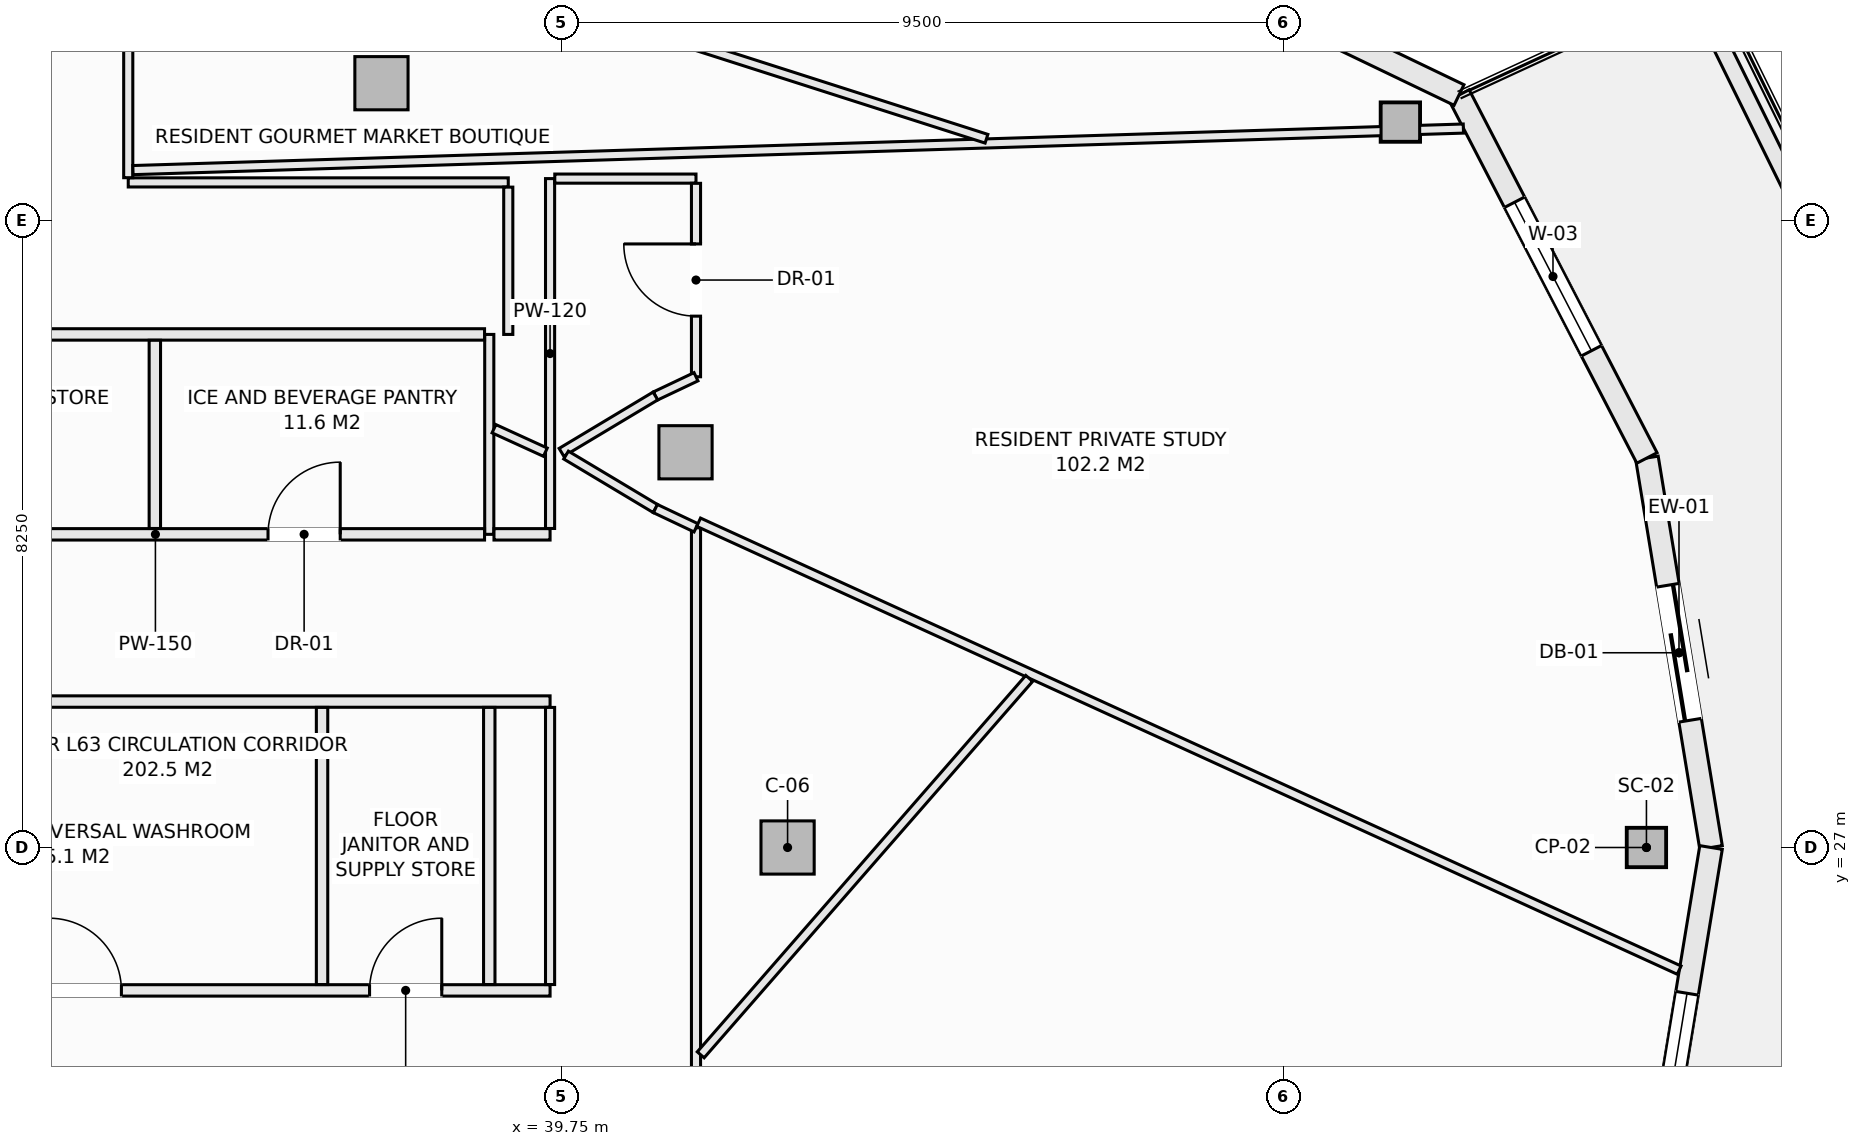
"""IFC4 building model, lengths in metres.
Left out: names, types, materials, properties, quantities, classifications, styles, units other than length and angle.
Written with IfcOpenShell. Run it as: python <this file> out.ifc"""

import sys

from ifc_helpers import new_model, si_unit, direction, frame, frame_2d, origin, origin_2d, place, context, subcontext, project, spatial, rectangle, hollow_rectangle, extrude, element, fill, save


model = new_model("IFC4")
c1 = context("Model", 3, precision=1e-05, world=origin(), true_north=direction((0.0, 1.0)))
c2 = subcontext(c1, "Body", "Model", "MODEL_VIEW")
j1 = project(units=[si_unit("LENGTHUNIT", "METRE"), si_unit("PLANEANGLEUNIT", "RADIAN")], contexts=[c1])
p1 = place(None, origin())
s1 = spatial("IfcSite", under=j1, at=p1, CompositionType="ELEMENT")
p2 = place(p1, origin())
s2 = spatial("IfcBuilding", under=s1, at=p2, CompositionType="ELEMENT")
p3 = place(p2, frame((0.0, 0.0, 236.0)))
s3 = spatial("IfcBuildingStorey", under=s2, at=p3, CompositionType="ELEMENT", Elevation=236.0)
for number, where, z_axis, x_axis in (
    (1, (54.025, 27.0, -0.27), (0.0, 0.0, 1.0), (1.0, 0.0, 0.0)),
    (2, (50.787, 36.544, -0.27), (0.0, 0.0, 1.0), (1.0, 0.0, 0.0)),
):
    element("IfcColumn", number, at=place(p3, frame(where, z_axis=z_axis, x_axis=x_axis)), inside=s3, PredefinedType="COLUMN", context=c2, shape_type="SweptSolid", body=[
        extrude(hollow_rectangle(XDim=0.508, YDim=0.508, WallThickness=0.019, at=origin_2d()), origin(), (0.0, 0.0, 1.0), 3.3),
    ])
for number, where, z_axis, x_axis in (
    (3, (42.725, 27.0, -0.27), (0.0, 0.0, 1.0), (1.0, 0.0, 0.0)),
    (4, (41.382, 32.199, -0.27), (0.0, 0.0, 1.0), (1.0, 0.0, 0.0)),
    (5, (37.382, 37.055, -0.27), (0.0, 0.0, 1.0), (1.0, 0.0, 0.0)),
):
    element("IfcColumn", number, at=place(p3, frame(where, z_axis=z_axis, x_axis=x_axis)), inside=s3, PredefinedType="COLUMN", context=c2, shape_type="SweptSolid", body=[
        extrude(rectangle(XDim=0.7, YDim=0.7, at=origin_2d()), origin(), (0.0, 0.0, 1.0), 3.3),
    ])
p4 = place(p3, frame((54.032, 32.125, 0.0), z_axis=(0.0, 0.0, 1.0), x_axis=(0.16237087798, -0.986729799886, 0.0)))
e6 = element("IfcWall", 6, at=p4, inside=s3, PredefinedType="SOLIDWALL", context=c2, shape_type="SweptSolid", body=[
    extrude(rectangle(XDim=5.193, YDim=0.3, at=frame_2d((2.597, 0.0))), origin(), (0.0, 0.0, 1.0), 2.605),
])
p5 = place(p4, frame((1.697, 0.0, 0.0)))
e7 = element("IfcOpeningElement", 7, at=p5, cuts=e6, PredefinedType="OPENING", context=c2, shape_type="SweptSolid", body=[
    extrude(rectangle(XDim=1.8, YDim=2.25, at=frame_2d((0.9, 1.125))), frame((0.0, 0.16, 0.0), z_axis=(0.0, -1.0, 0.0), x_axis=(1.0, 0.0, 0.0)), (0.0, 0.0, 1.0), 0.32),
])
p6 = place(p3, frame((51.559, 36.9, 0.0), z_axis=(0.0, 0.0, 1.0), x_axis=(0.459808219482, -0.888018243786, 0.0)))
e8 = element("IfcWall", 8, at=p6, inside=s3, PredefinedType="SOLIDWALL", context=c2, shape_type="SweptSolid", body=[
    extrude(rectangle(XDim=5.378, YDim=0.3, at=frame_2d((2.689, 0.0))), origin(), (0.0, 0.0, 1.0), 2.605),
])
p7 = place(p6, frame((1.589, 0.0, 0.72)))
e9 = element("IfcOpeningElement", 9, at=p7, cuts=e8, PredefinedType="OPENING", context=c2, shape_type="SweptSolid", body=[
    extrude(rectangle(XDim=2.2, YDim=1.65, at=frame_2d((1.1, 0.825))), frame((0.0, 0.16, 0.0), z_axis=(0.0, -1.0, 0.0), x_axis=(1.0, 0.0, 0.0)), (0.0, 0.0, 1.0), 0.32),
])
p8 = place(p3, frame((46.133, 39.507, 0.0), z_axis=(0.0, 0.0, 1.0), x_axis=(0.901348331142, -0.433094892545, 0.0)))
e10 = element("IfcWall", 10, at=p8, inside=s3, PredefinedType="SOLIDWALL", context=c2, shape_type="SweptSolid", body=[
    extrude(rectangle(XDim=6.021, YDim=0.3, at=frame_2d((3.01, 0.0))), origin(), (0.0, 0.0, 1.0), 2.605),
])
p9 = place(p8, frame((1.91, 0.0, 0.72)))
e11 = element("IfcOpeningElement", 11, at=p9, cuts=e10, PredefinedType="OPENING", context=c2, shape_type="SweptSolid", body=[
    extrude(rectangle(XDim=2.2, YDim=1.65, at=frame_2d((1.1, 0.825))), frame((0.0, 0.16, 0.0), z_axis=(0.0, -1.0, 0.0), x_axis=(1.0, 0.0, 0.0)), (0.0, 0.0, 1.0), 0.32),
])
p10 = place(p3, frame((54.032, 21.875, 0.0), z_axis=(0.0, 0.0, 1.0), x_axis=(0.16237087798, 0.986729799886, 0.0)))
e12 = element("IfcWall", 12, at=p10, inside=s3, PredefinedType="SOLIDWALL", context=c2, shape_type="SweptSolid", body=[
    extrude(rectangle(XDim=5.193, YDim=0.3, at=frame_2d((2.597, 0.0))), origin(), (0.0, 0.0, 1.0), 2.605),
])
p11 = place(p10, frame((1.05, 0.0, 0.72)))
e13 = element("IfcOpeningElement", 13, at=p11, cuts=e12, PredefinedType="OPENING", context=c2, shape_type="SweptSolid", body=[
    extrude(rectangle(XDim=2.2, YDim=1.65, at=frame_2d((1.1, 0.825))), frame((0.0, 0.16, 0.0), z_axis=(0.0, -1.0, 0.0), x_axis=(1.0, 0.0, 0.0)), (0.0, 0.0, 1.0), 0.32),
])
p12 = place(p3, frame((54.616, 38.347, 0.0), z_axis=(0.0, 0.0, 1.0), x_axis=(0.441640961804, -0.897191875162, 0.0)))
e14 = element("IfcWall", 14, at=p12, inside=s3, PredefinedType="PARAPET", context=c2, shape_type="SweptSolid", body=[
    extrude(rectangle(XDim=6.178, YDim=0.22, at=frame_2d((3.089, 0.0))), origin(), (0.0, 0.0, 1.0), 0.52),
])
p13 = place(p3, frame((29.96, 25.12, 0.0), z_axis=(0.0, 0.0, 1.0), x_axis=(1.0, 0.0, 0.0)))
e15 = element("IfcWall", 15, at=p13, inside=s3, PredefinedType="PARTITIONING", context=c2, shape_type="SweptSolid", body=[
    extrude(rectangle(XDim=9.64, YDim=0.15, at=frame_2d((4.82, 0.0))), origin(), (0.0, 0.0, 1.0), 3.03),
])
p14 = place(p13, frame((3.05, 0.0, 0.0)))
e16 = element("IfcOpeningElement", 16, at=p14, cuts=e15, PredefinedType="OPENING", context=c2, shape_type="SweptSolid", body=[
    extrude(rectangle(XDim=0.95, YDim=2.1, at=frame_2d((0.475, 1.05))), frame((0.0, 0.085, 0.0), z_axis=(0.0, -1.0, 0.0), x_axis=(1.0, 0.0, 0.0)), (0.0, 0.0, 1.0), 0.17),
])
p15 = place(p13, frame((7.265, 0.0, 0.0)))
e17 = element("IfcOpeningElement", 17, at=p15, cuts=e15, PredefinedType="OPENING", context=c2, shape_type="SweptSolid", body=[
    extrude(rectangle(XDim=0.95, YDim=2.1, at=frame_2d((0.475, 1.05))), frame((0.0, 0.085, 0.0), z_axis=(0.0, -1.0, 0.0), x_axis=(1.0, 0.0, 0.0)), (0.0, 0.0, 1.0), 0.17),
])
p16 = place(p3, frame((30.077, 28.92, 0.0), z_axis=(0.0, 0.0, 1.0), x_axis=(1.0, 0.0, 0.0)))
e18 = element("IfcWall", 18, at=p16, inside=s3, PredefinedType="PARTITIONING", context=c2, shape_type="SweptSolid", body=[
    extrude(rectangle(XDim=9.523, YDim=0.15, at=frame_2d((4.762, 0.0))), origin(), (0.0, 0.0, 1.0), 3.03),
])
for number, where, z_axis, x_axis in (
    (19, (36.6, 25.197, 0.0), (0.0, 0.0, 1.0), (0.0, 1.0, 0.0)),
    (20, (38.8, 25.197, 0.0), (0.0, 0.0, 1.0), (0.0, 1.0, 0.0)),
):
    element("IfcWall", number, at=place(p3, frame(where, z_axis=z_axis, x_axis=x_axis)), inside=s3, PredefinedType="PARTITIONING", context=c2, shape_type="SweptSolid", body=[
        extrude(rectangle(XDim=3.646, YDim=0.15, at=frame_2d((1.823, 0.0))), origin(), (0.0, 0.0, 1.0), 3.03),
    ])
p17 = place(p3, frame((38.8, 31.12, 0.0), z_axis=(0.0, 0.0, 1.0), x_axis=(0.0, 1.0, 0.0)))
e21 = element("IfcWall", 21, at=p17, inside=s3, PredefinedType="PARTITIONING", context=c2, shape_type="SweptSolid", body=[
    extrude(rectangle(XDim=2.63, YDim=0.12, at=frame_2d((1.315, 0.0))), origin(), (0.0, 0.0, 1.0), 3.03),
])
p18 = place(p3, frame((30.077, 31.12, 0.0), z_axis=(0.0, 0.0, 1.0), x_axis=(1.0, 0.0, 0.0)))
e22 = element("IfcWall", 22, at=p18, inside=s3, PredefinedType="PARTITIONING", context=c2, shape_type="SweptSolid", body=[
    extrude(rectangle(XDim=8.661, YDim=0.15, at=frame_2d((4.331, 0.0))), origin(), (0.0, 0.0, 1.0), 3.03),
])
p19 = place(p18, frame((1.892, 0.0, 0.0)))
e23 = element("IfcOpeningElement", 23, at=p19, cuts=e22, PredefinedType="OPENING", context=c2, shape_type="SweptSolid", body=[
    extrude(rectangle(XDim=0.95, YDim=2.1, at=frame_2d((0.475, 1.05))), frame((0.0, 0.085, 0.0), z_axis=(0.0, -1.0, 0.0), x_axis=(1.0, 0.0, 0.0)), (0.0, 0.0, 1.0), 0.17),
])
p20 = place(p18, frame((5.812, 0.0, 0.0)))
e24 = element("IfcOpeningElement", 24, at=p20, cuts=e22, PredefinedType="OPENING", context=c2, shape_type="SweptSolid", body=[
    extrude(rectangle(XDim=0.95, YDim=2.1, at=frame_2d((0.475, 1.05))), frame((0.0, 0.085, 0.0), z_axis=(0.0, -1.0, 0.0), x_axis=(1.0, 0.0, 0.0)), (0.0, 0.0, 1.0), 0.17),
])
p21 = place(p3, frame((38.862, 31.12, 0.0), z_axis=(0.0, 0.0, 1.0), x_axis=(1.0, 0.0, 0.0)))
e25 = element("IfcWall", 25, at=p21, inside=s3, PredefinedType="PARTITIONING", context=c2, shape_type="SweptSolid", body=[
    extrude(rectangle(XDim=0.738, YDim=0.15, at=frame_2d((0.369, 0.0))), origin(), (0.0, 0.0, 1.0), 3.03),
])
p22 = place(p3, frame((30.077, 33.75, 0.0), z_axis=(0.0, 0.0, 1.0), x_axis=(1.0, 0.0, 0.0)))
e26 = element("IfcWall", 26, at=p22, inside=s3, PredefinedType="PARTITIONING", context=c2, shape_type="SweptSolid", body=[
    extrude(rectangle(XDim=8.661, YDim=0.15, at=frame_2d((4.331, 0.0))), origin(), (0.0, 0.0, 1.0), 3.03),
])
p23 = place(p3, frame((34.4, 31.197, 0.0), z_axis=(0.0, 0.0, 1.0), x_axis=(0.0, 1.0, 0.0)))
e27 = element("IfcWall", 27, at=p23, inside=s3, PredefinedType="PARTITIONING", context=c2, shape_type="SweptSolid", body=[
    extrude(rectangle(XDim=2.476, YDim=0.15, at=frame_2d((1.238, 0.0))), origin(), (0.0, 0.0, 1.0), 3.03),
])
p24 = place(p3, frame((34.05, 35.75, 0.0), z_axis=(0.0, 0.0, 1.0), x_axis=(1.0, 0.0, 0.0)))
e28 = element("IfcWall", 28, at=p24, inside=s3, PredefinedType="PARTITIONING", context=c2, shape_type="SweptSolid", body=[
    extrude(rectangle(XDim=5.0, YDim=0.12, at=frame_2d((2.5, 0.0))), origin(), (0.0, 0.0, 1.0), 2.478),
])
p25 = place(p3, frame((34.05, 35.812, 0.0), z_axis=(0.0, 0.0, 1.0), x_axis=(0.0, 1.0, 0.0)))
e29 = element("IfcWall", 29, at=p25, inside=s3, PredefinedType="PARTITIONING", context=c2, shape_type="SweptSolid", body=[
    extrude(rectangle(XDim=6.326, YDim=0.12, at=frame_2d((3.163, 0.0))), origin(), (0.0, 0.0, 1.0), 2.77),
])
p26 = place(p25, frame((1.799, 0.0, 0.0)))
e30 = element("IfcOpeningElement", 30, at=p26, cuts=e29, PredefinedType="OPENING", context=c2, shape_type="SweptSolid", body=[
    extrude(rectangle(XDim=0.95, YDim=2.1, at=frame_2d((0.475, 1.05))), frame((0.0, 0.07, 0.0), z_axis=(0.0, -1.0, 0.0), x_axis=(1.0, 0.0, 0.0)), (0.0, 0.0, 1.0), 0.14),
])
p27 = place(p25, frame((4.54, 0.0, 0.0)))
e31 = element("IfcOpeningElement", 31, at=p27, cuts=e29, PredefinedType="OPENING", context=c2, shape_type="SweptSolid", body=[
    extrude(rectangle(XDim=0.95, YDim=2.1, at=frame_2d((0.475, 1.05))), frame((0.0, 0.07, 0.0), z_axis=(0.0, -1.0, 0.0), x_axis=(1.0, 0.0, 0.0)), (0.0, 0.0, 1.0), 0.14),
])
p28 = place(p3, frame((39.05, 33.75, 0.0), z_axis=(0.0, 0.0, 1.0), x_axis=(0.0, 1.0, 0.0)))
e32 = element("IfcWall", 32, at=p28, inside=s3, PredefinedType="PARTITIONING", context=c2, shape_type="SweptSolid", body=[
    extrude(rectangle(XDim=1.938, YDim=0.12, at=frame_2d((0.969, 0.0))), origin(), (0.0, 0.0, 1.0), 3.03),
])
p29 = place(p3, frame((39.6, 25.197, 0.0), z_axis=(0.0, 0.0, 1.0), x_axis=(0.0, 1.0, 0.0)))
e33 = element("IfcWall", 33, at=p29, inside=s3, PredefinedType="PARTITIONING", context=c2, shape_type="SweptSolid", body=[
    extrude(rectangle(XDim=3.646, YDim=0.12, at=frame_2d((1.823, 0.0))), origin(), (0.0, 0.0, 1.0), 3.03),
])
p30 = place(p3, frame((39.6, 31.197, 0.0), z_axis=(0.0, 0.0, 1.0), x_axis=(0.0, 1.0, 0.0)))
e34 = element("IfcWall", 34, at=p30, inside=s3, PredefinedType="PARTITIONING", context=c2, shape_type="SweptSolid", body=[
    extrude(rectangle(XDim=4.603, YDim=0.12, at=frame_2d((2.302, 0.0))), origin(), (0.0, 0.0, 1.0), 3.03),
])
p31 = place(p3, frame((39.662, 35.8, 0.0), z_axis=(0.0, 0.0, 1.0), x_axis=(1.0, 0.0, 0.0)))
e35 = element("IfcWall", 35, at=p31, inside=s3, PredefinedType="PARTITIONING", context=c2, shape_type="SweptSolid", body=[
    extrude(rectangle(XDim=1.858, YDim=0.12, at=frame_2d((0.929, 0.0))), origin(), (0.0, 0.0, 1.0), 2.77),
])
p32 = place(p3, frame((41.52, 22.794, 0.0), z_axis=(0.0, 0.0, 1.0), x_axis=(0.0, 1.0, 0.0)))
e36 = element("IfcWall", 36, at=p32, inside=s3, PredefinedType="PARTITIONING", context=c2, shape_type="SweptSolid", body=[
    extrude(rectangle(XDim=8.412, YDim=0.12, at=frame_2d((4.206, 0.0))), origin(), (0.0, 0.0, 1.0), 2.478),
])
p33 = place(p3, frame((41.52, 33.193, 0.0), z_axis=(0.0, 0.0, 1.0), x_axis=(0.0, 1.0, 0.0)))
e37 = element("IfcWall", 37, at=p33, inside=s3, PredefinedType="PARTITIONING", context=c2, shape_type="SweptSolid", body=[
    extrude(rectangle(XDim=2.545, YDim=0.12, at=frame_2d((1.272, 0.0))), origin(), (0.0, 0.0, 1.0), 3.03),
])
p34 = place(p33, frame((0.798, 0.0, 0.0)))
e38 = element("IfcOpeningElement", 38, at=p34, cuts=e37, PredefinedType="OPENING", context=c2, shape_type="SweptSolid", body=[
    extrude(rectangle(XDim=0.95, YDim=2.1, at=frame_2d((0.475, 1.05))), frame((0.0, 0.07, 0.0), z_axis=(0.0, -1.0, 0.0), x_axis=(1.0, 0.0, 0.0)), (0.0, 0.0, 1.0), 0.14),
])
p35 = place(p3, frame((40.986, 32.94, 0.0), z_axis=(0.0, 0.0, 1.0), x_axis=(0.90356951601, 0.428441512621, 0.0)))
e39 = element("IfcWall", 39, at=p35, inside=s3, PredefinedType="PARTITIONING", context=c2, shape_type="SweptSolid", body=[
    extrude(rectangle(XDim=0.591, YDim=0.12, at=frame_2d((0.295, 0.0))), origin(), (0.0, 0.0, 1.0), 3.03),
])
p36 = place(p3, frame((39.75, 32.199, 0.0), z_axis=(0.0, 0.0, 1.0), x_axis=(0.857702120906, 0.514146935996, 0.0)))
e40 = element("IfcWall", 40, at=p36, inside=s3, PredefinedType="PARTITIONING", context=c2, shape_type="SweptSolid", body=[
    extrude(rectangle(XDim=1.441, YDim=0.12, at=frame_2d((0.721, 0.0))), origin(), (0.0, 0.0, 1.0), 3.03),
])
p37 = place(p3, frame((39.81, 32.163, 0.0), z_axis=(0.0, 0.0, 1.0), x_axis=(0.858011245414, -0.513630901273, 0.0)))
e41 = element("IfcWall", 41, at=p37, inside=s3, PredefinedType="PARTITIONING", context=c2, shape_type="SweptSolid", body=[
    extrude(rectangle(XDim=1.37, YDim=0.12, at=frame_2d((0.685, 0.0))), origin(), (0.0, 0.0, 1.0), 3.03),
])
p38 = place(p3, frame((40.986, 31.459, 0.0), z_axis=(0.0, 0.0, 1.0), x_axis=(0.903729424576, -0.428104107847, 0.0)))
e42 = element("IfcWall", 42, at=p38, inside=s3, PredefinedType="PARTITIONING", context=c2, shape_type="SweptSolid", body=[
    extrude(rectangle(XDim=0.591, YDim=0.12, at=frame_2d((0.295, 0.0))), origin(), (0.0, 0.0, 1.0), 3.03),
])
p39 = place(p3, frame((38.862, 32.51, 0.0), z_axis=(0.0, 0.0, 1.0), x_axis=(0.909577362943, -0.415534620485, 0.0)))
e43 = element("IfcWall", 43, at=p39, inside=s3, PredefinedType="PARTITIONING", context=c2, shape_type="SweptSolid", body=[
    extrude(rectangle(XDim=0.743, YDim=0.12, at=frame_2d((0.372, 0.0))), origin(), (0.0, 0.0, 1.0), 3.03),
])
p40 = place(p3, frame((41.555, 31.279, 0.0), z_axis=(0.0, 0.0, 1.0), x_axis=(0.909606839037, -0.41547009324, 0.0)))
e44 = element("IfcWall", 44, at=p40, inside=s3, PredefinedType="PARTITIONING", context=c2, shape_type="SweptSolid", body=[
    extrude(rectangle(XDim=14.183, YDim=0.12, at=frame_2d((7.091, 0.0))), origin(), (0.0, 0.0, 1.0), 1.823),
])
p41 = place(p3, frame((41.582, 24.272, 0.0), z_axis=(0.0, 0.0, 1.0), x_axis=(0.657567979998, 0.753395216126, 0.0)))
e45 = element("IfcWall", 45, at=p41, inside=s3, PredefinedType="PARTITIONING", context=c2, shape_type="SweptSolid", body=[
    extrude(rectangle(XDim=6.573, YDim=0.12, at=frame_2d((3.287, 0.0))), origin(), (0.0, 0.0, 1.0), 2.478),
])
p42 = place(p3, frame((34.112, 35.912, 0.0), z_axis=(0.0, 0.0, 1.0), x_axis=(0.999512755879, 0.031212991442, 0.0)))
e46 = element("IfcWall", 46, at=p42, inside=s3, PredefinedType="PARTITIONING", context=c2, shape_type="SweptSolid", body=[
    extrude(rectangle(XDim=17.513, YDim=0.12, at=frame_2d((8.756, 0.0))), origin(), (0.0, 0.0, 1.0), 1.823),
])
p43 = place(p3, frame((34.112, 39.918, 0.0), z_axis=(0.0, 0.0, 1.0), x_axis=(0.95242438762, -0.304774975789, 0.0)))
e47 = element("IfcWall", 47, at=p43, inside=s3, PredefinedType="PARTITIONING", context=c2, shape_type="SweptSolid", body=[
    extrude(rectangle(XDim=11.791, YDim=0.12, at=frame_2d((5.896, 0.0))), origin(), (0.0, 0.0, 1.0), 3.03),
])
p44 = place(p5, origin())
e48 = element("IfcDoor", 48, at=p44, inside=s3, OperationType="SLIDING_TO_LEFT", PredefinedType="DOOR", context=c2, shape_type="SweptSolid", body=[
    extrude(rectangle(XDim=1.8, YDim=2.25, at=frame_2d((0.9, 1.125))), frame((0.0, 0.025, 0.0), z_axis=(0.0, -1.0, 0.0), x_axis=(1.0, 0.0, 0.0)), (0.0, 0.0, 1.0), 0.05),
])
fill(e7, e48)
p45 = place(p7, origin())
e49 = element("IfcWindow", 49, at=p45, inside=s3, PartitioningType="SINGLE_PANEL", PredefinedType="WINDOW", context=c2, shape_type="SweptSolid", body=[
    extrude(rectangle(XDim=2.2, YDim=1.65, at=frame_2d((1.1, 0.825))), frame((0.0, 0.03, 0.0), z_axis=(0.0, -1.0, 0.0), x_axis=(1.0, 0.0, 0.0)), (0.0, 0.0, 1.0), 0.06),
])
fill(e9, e49)
p46 = place(p11, origin())
e50 = element("IfcWindow", 50, at=p46, inside=s3, PartitioningType="SINGLE_PANEL", PredefinedType="WINDOW", context=c2, shape_type="SweptSolid", body=[
    extrude(rectangle(XDim=2.2, YDim=1.65, at=frame_2d((1.1, 0.825))), frame((0.0, 0.03, 0.0), z_axis=(0.0, -1.0, 0.0), x_axis=(1.0, 0.0, 0.0)), (0.0, 0.0, 1.0), 0.06),
])
fill(e13, e50)
p47 = place(p14, origin())
e51 = element("IfcDoor", 51, at=p47, inside=s3, OperationType="SINGLE_SWING_LEFT", PredefinedType="DOOR", context=c2, shape_type="SweptSolid", body=[
    extrude(rectangle(XDim=0.95, YDim=2.1, at=frame_2d((0.475, 1.05))), frame((0.0, 0.025, 0.0), z_axis=(0.0, -1.0, 0.0), x_axis=(1.0, 0.0, 0.0)), (0.0, 0.0, 1.0), 0.05),
])
fill(e16, e51)
p48 = place(p15, origin())
e52 = element("IfcDoor", 52, at=p48, inside=s3, OperationType="SINGLE_SWING_RIGHT", PredefinedType="DOOR", context=c2, shape_type="SweptSolid", body=[
    extrude(rectangle(XDim=0.95, YDim=2.1, at=frame_2d((0.475, 1.05))), frame((0.0, 0.025, 0.0), z_axis=(0.0, -1.0, 0.0), x_axis=(1.0, 0.0, 0.0)), (0.0, 0.0, 1.0), 0.05),
])
fill(e17, e52)
p49 = place(p20, origin())
e53 = element("IfcDoor", 53, at=p49, inside=s3, OperationType="SINGLE_SWING_RIGHT", PredefinedType="DOOR", context=c2, shape_type="SweptSolid", body=[
    extrude(rectangle(XDim=0.95, YDim=2.1, at=frame_2d((0.475, 1.05))), frame((0.0, 0.025, 0.0), z_axis=(0.0, -1.0, 0.0), x_axis=(1.0, 0.0, 0.0)), (0.0, 0.0, 1.0), 0.05),
])
fill(e24, e53)
p50 = place(p34, origin())
e54 = element("IfcDoor", 54, at=p50, inside=s3, OperationType="SINGLE_SWING_RIGHT", PredefinedType="DOOR", context=c2, shape_type="SweptSolid", body=[
    extrude(rectangle(XDim=0.95, YDim=2.1, at=frame_2d((0.475, 1.05))), frame((0.0, 0.025, 0.0), z_axis=(0.0, -1.0, 0.0), x_axis=(1.0, 0.0, 0.0)), (0.0, 0.0, 1.0), 0.05),
])
fill(e38, e54)
save(model, sys.argv[1])
